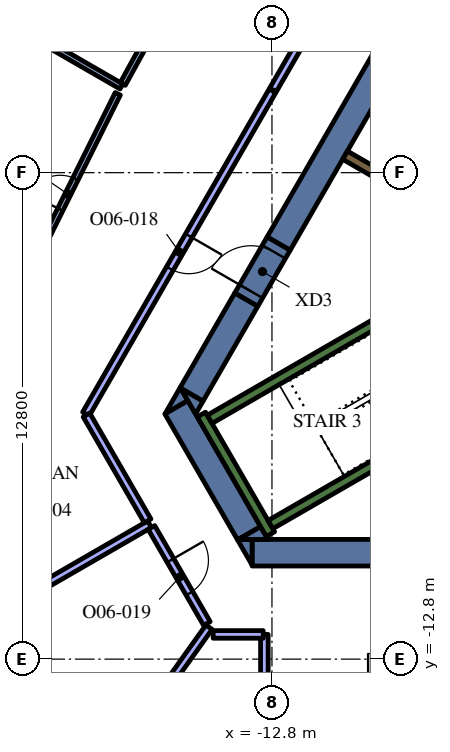
"""IFC4 building model, lengths in metres.
Left out: names, types, materials, properties, quantities, classifications, styles, units other than length and angle.
Written with IfcOpenShell. Run it as: python <this file> out.ifc"""

import sys

from ifc_helpers import new_model, si_unit, direction, frame, frame_2d, origin, place, context, subcontext, project, spatial, polyline, rectangle, outline, extrude, element, fill, save


model = new_model("IFC4")
c1 = context("Model", 3, precision=1e-05, world=origin(), true_north=direction((0.0, 1.0)))
c2 = subcontext(c1, "Body", "Model", "MODEL_VIEW")
j1 = project(units=[si_unit("LENGTHUNIT", "METRE"), si_unit("PLANEANGLEUNIT", "RADIAN")], contexts=[c1])
p1 = place(None, origin())
s1 = spatial("IfcSite", under=j1, at=p1, CompositionType="ELEMENT")
p2 = place(p1, origin())
s2 = spatial("IfcBuilding", under=s1, at=p2, CompositionType="ELEMENT")
p3 = place(p2, frame((0.0, 0.0, 201.6)))
s3 = spatial("IfcBuildingStorey", under=s2, at=p3, CompositionType="ELEMENT", Elevation=201.6)
p4 = place(p3, frame((8.904, -10.0, 0.0), z_axis=(0.0, 0.0, 1.0), x_axis=(-1.0, 0.0, 0.0)))
e1 = element("IfcWall", 1, at=p4, inside=s3, PredefinedType="SOLIDWALL", context=c2, shape_type="SweptSolid", body=[
    extrude(rectangle(XDim=22.226, YDim=0.7, at=frame_2d((11.113, 0.0))), origin(), (0.0, 0.0, 1.0), 4.2),
])
p5 = place(p3, origin())
e2 = element("IfcWall", 2, at=p5, inside=s3, PredefinedType="SOLIDWALL", context=c2, shape_type="SweptSolid", body=[
    extrude(outline(polyline([(-13.712, -9.65), (-13.324, -9.65), (-13.324, -10.322), (-13.712, -9.65)])), origin(), (0.0, 0.0, 1.0), 4.2),
])
p6 = place(p3, frame((-13.402, -9.487, 0.0), z_axis=(0.0, 0.0, 1.0), x_axis=(-0.500020498207, 0.866013568815, 0.0)))
e3 = element("IfcWall", 3, at=p6, inside=s3, PredefinedType="SOLIDWALL", context=c2, shape_type="SweptSolid", body=[
    extrude(rectangle(XDim=3.829, YDim=0.7, at=frame_2d((1.915, 0.0))), origin(), (0.0, 0.0, 1.0), 4.2),
])
e4 = element("IfcWall", 4, at=p5, inside=s3, PredefinedType="SOLIDWALL", context=c2, shape_type="SweptSolid", body=[
    extrude(outline(polyline([(-15.014, -5.995), (-15.611, -6.339), (-15.213, -5.65), (-15.014, -5.995)])), origin(), (0.0, 0.0, 1.0), 4.2),
])
e5 = element("IfcWall", 5, at=p5, inside=s3, PredefinedType="SOLIDWALL", context=c2, shape_type="SweptSolid", body=[
    extrude(outline(polyline([(-12.904, -9.65), (-13.68, -9.65), (-13.098, -9.314), (-12.904, -9.65)])), origin(), (0.0, 0.0, 1.0), 4.2),
])
p7 = place(p3, frame((-13.475, -3.339, 0.0), z_axis=(0.0, 0.0, 1.0), x_axis=(-0.500008214683, -0.866020660983, 0.0)))
e6 = element("IfcWall", 6, at=p7, inside=s3, PredefinedType="SOLIDWALL", context=c2, shape_type="SweptSolid", body=[
    extrude(rectangle(XDim=2.884, YDim=0.7, at=frame_2d((1.442, 0.0))), origin(), (0.0, 0.0, 1.0), 4.2),
])
e7 = element("IfcWall", 7, at=p5, inside=s3, PredefinedType="SOLIDWALL", context=c2, shape_type="SweptSolid", body=[
    extrude(outline(polyline([(-14.809, -6.35), (-15.197, -5.678), (-14.615, -6.014), (-14.809, -6.35)])), origin(), (0.0, 0.0, 1.0), 4.2),
])
p8 = place(p3, frame((-12.625, -1.867, 0.0), z_axis=(0.0, 0.0, 1.0), x_axis=(0.499998841866, 0.866026072432, 0.0)))
e8 = element("IfcWall", 8, at=p8, inside=s3, PredefinedType="SOLIDWALL", context=c2, shape_type="SweptSolid", body=[
    extrude(rectangle(XDim=16.694, YDim=0.7, at=frame_2d((8.347, 0.0))), origin(), (0.0, 0.0, 1.0), 4.2),
])
p9 = place(p3, frame((-12.84, -9.511, 0.0), z_axis=(0.0, 0.0, 1.0), x_axis=(-0.499997733992, 0.866026712061, 0.0)))
e9 = element("IfcWall", 9, at=p9, inside=s3, PredefinedType="SOLIDWALL", context=c2, shape_type="SweptSolid", body=[
    extrude(rectangle(XDim=3.634, YDim=0.25, at=frame_2d((1.817, 0.0))), origin(), (0.0, 0.0, 1.0), 4.2),
])
p10 = place(p3, frame((-14.44, -6.49, 0.0), z_axis=(0.0, 0.0, 1.0), x_axis=(0.866022966069, 0.500004222222, 0.0)))
e10 = element("IfcWall", 10, at=p10, inside=s3, PredefinedType="SOLIDWALL", context=c2, shape_type="SweptSolid", body=[
    extrude(rectangle(XDim=6.8, YDim=0.25, at=frame_2d((3.4, 0.0))), origin(), (0.0, 0.0, 1.0), 4.2),
])
p11 = place(p3, frame((-12.84, -9.261, 0.0), z_axis=(0.0, 0.0, 1.0), x_axis=(0.866016039709, 0.500016218704, 0.0)))
e11 = element("IfcWall", 11, at=p11, inside=s3, PredefinedType="SOLIDWALL", context=c2, shape_type="SweptSolid", body=[
    extrude(rectangle(XDim=7.05, YDim=0.25, at=frame_2d((3.525, 0.0))), origin(), (0.0, 0.0, 1.0), 4.2),
])
p12 = place(p3, frame((-8.106, -1.14, 0.0), z_axis=(0.0, 0.0, 1.0), x_axis=(-0.866008981251, 0.500028443584, 0.0)))
e12 = element("IfcWall", 12, at=p12, inside=s3, PredefinedType="SOLIDWALL", context=c2, shape_type="SweptSolid", body=[
    extrude(rectangle(XDim=3.2, YDim=0.25, at=frame_2d((1.6, 0.0))), origin(), (0.0, 0.0, 1.0), 4.2),
])
p13 = place(p3, frame((-13.475, -3.339, 0.0), z_axis=(0.0, 0.0, 1.0), x_axis=(0.499954529098, 0.86605165483, 0.0)))
e13 = element("IfcWall", 13, at=p13, inside=s3, PredefinedType="SOLIDWALL", context=c2, shape_type="SweptSolid", body=[
    extrude(rectangle(XDim=1.7, YDim=0.7, at=frame_2d((0.85, 0.0))), origin(), (0.0, 0.0, 1.0), 4.2),
])
p14 = place(p13, frame((0.25, 0.0, 0.0)))
e14 = element("IfcOpeningElement", 14, at=p14, cuts=e13, PredefinedType="OPENING", context=c2, shape_type="SweptSolid", body=[
    extrude(rectangle(XDim=1.2, YDim=2.1, at=frame_2d((0.6, 1.05))), frame((0.0, 0.36, 0.0), z_axis=(0.0, -1.0, 0.0), x_axis=(1.0, 0.0, 0.0)), (0.0, 0.0, 1.0), 0.72),
])
p15 = place(p3, frame((-18.709, -17.916, 0.0), z_axis=(0.0, 0.0, 1.0), x_axis=(0.581023578026, 0.813886725397, 0.0)))
e15 = element("IfcWall", 15, at=p15, inside=s3, PredefinedType="PARTITIONING", context=c2, shape_type="SweptSolid", body=[
    extrude(rectangle(XDim=7.318, YDim=0.2, at=frame_2d((3.659, 0.0))), origin(), (0.0, 0.0, 1.0), 3.45),
])
p16 = place(p3, frame((-13.0, -12.15, 0.0), z_axis=(0.0, 0.0, 1.0), x_axis=(0.0, -1.0, 0.0)))
e16 = element("IfcWall", 16, at=p16, inside=s3, PredefinedType="PARTITIONING", context=c2, shape_type="SweptSolid", body=[
    extrude(rectangle(XDim=1.5, YDim=0.2, at=frame_2d((0.75, 0.0))), origin(), (0.0, 0.0, 1.0), 3.45),
])
p17 = place(p3, frame((-14.347, -12.15, 0.0), z_axis=(0.0, 0.0, 1.0), x_axis=(1.0, 0.0, 0.0)))
e17 = element("IfcWall", 17, at=p17, inside=s3, PredefinedType="PARTITIONING", context=c2, shape_type="SweptSolid", body=[
    extrude(rectangle(XDim=1.317, YDim=0.2, at=frame_2d((0.659, 0.0))), origin(), (0.0, 0.0, 1.0), 3.45),
])
p18 = place(p3, frame((-16.761, 2.268, 0.0), z_axis=(0.0, 0.0, 1.0), x_axis=(-0.866022812202, 0.500004488726, 0.0)))
e18 = element("IfcWall", 18, at=p18, inside=s3, PredefinedType="PARTITIONING", context=c2, shape_type="SweptSolid", body=[
    extrude(rectangle(XDim=3.247, YDim=0.15, at=frame_2d((1.624, 0.0))), origin(), (0.0, 0.0, 1.0), 3.45),
])
p19 = place(p3, frame((-16.725, 2.333, 0.0), z_axis=(0.0, 0.0, 1.0), x_axis=(0.480955103875, 0.876745224142, 0.0)))
e19 = element("IfcWall", 19, at=p19, inside=s3, PredefinedType="PARTITIONING", context=c2, shape_type="SweptSolid", body=[
    extrude(rectangle(XDim=6.129, YDim=0.15, at=frame_2d((3.064, 0.0))), origin(), (0.0, 0.0, 1.0), 3.45),
])
p20 = place(p19, frame((2.629, 0.0, 0.0)))
e20 = element("IfcOpeningElement", 20, at=p20, cuts=e19, PredefinedType="OPENING", context=c2, shape_type="SweptSolid", body=[
    extrude(rectangle(XDim=0.9, YDim=2.1, at=frame_2d((0.45, 1.05))), frame((0.0, 0.085, 0.0), z_axis=(0.0, -1.0, 0.0), x_axis=(1.0, 0.0, 0.0)), (0.0, 0.0, 1.0), 0.17),
])
p21 = place(p3, frame((-19.467, -3.175, 0.0), z_axis=(0.0, 0.0, 1.0), x_axis=(0.445180755526, 0.895440726631, 0.0)))
e21 = element("IfcWall", 21, at=p21, inside=s3, PredefinedType="PARTITIONING", context=c2, shape_type="SweptSolid", body=[
    extrude(rectangle(XDim=5.864, YDim=0.15, at=frame_2d((2.932, 0.0))), origin(), (0.0, 0.0, 1.0), 3.45),
])
p22 = place(p21, frame((2.464, 0.0, 0.0)))
e22 = element("IfcOpeningElement", 22, at=p22, cuts=e21, PredefinedType="OPENING", context=c2, shape_type="SweptSolid", body=[
    extrude(rectangle(XDim=0.9, YDim=2.1, at=frame_2d((0.45, 1.05))), frame((0.0, 0.085, 0.0), z_axis=(0.0, -1.0, 0.0), x_axis=(1.0, 0.0, 0.0)), (0.0, 0.0, 1.0), 0.17),
])
p23 = place(p3, frame((-16.021, -9.25, 0.0), z_axis=(0.0, 0.0, 1.0), x_axis=(-0.86601739438, -0.500013872438, 0.0)))
e23 = element("IfcWall", 23, at=p23, inside=s3, PredefinedType="PARTITIONING", context=c2, shape_type="SweptSolid", body=[
    extrude(rectangle(XDim=6.478, YDim=0.2, at=frame_2d((3.239, 0.0))), origin(), (0.0, 0.0, 1.0), 3.45),
])
p24 = place(p3, frame((-8.272, 9.972, 0.0), z_axis=(0.0, 0.0, 1.0), x_axis=(-0.5000018851, -0.866024315419, 0.0)))
e24 = element("IfcWall", 24, at=p24, inside=s3, PredefinedType="PARTITIONING", context=c2, shape_type="SweptSolid", body=[
    extrude(rectangle(XDim=9.0, YDim=0.2, at=frame_2d((4.5, 0.0))), origin(), (0.0, 0.0, 1.0), 3.45),
])
p25 = place(p3, frame((-12.787, 2.152, 0.0), z_axis=(0.0, 0.0, 1.0), x_axis=(-0.50000660679, -0.866021589319, 0.0)))
e25 = element("IfcWall", 25, at=p25, inside=s3, PredefinedType="PARTITIONING", context=c2, shape_type="SweptSolid", body=[
    extrude(rectangle(XDim=9.817, YDim=0.2, at=frame_2d((4.909, 0.0))), origin(), (0.0, 0.0, 1.0), 3.45),
])
p26 = place(p25, frame((4.4, 0.0, 0.0)))
e26 = element("IfcOpeningElement", 26, at=p26, cuts=e25, PredefinedType="OPENING", context=c2, shape_type="SweptSolid", body=[
    extrude(rectangle(XDim=1.0, YDim=2.1, at=frame_2d((0.5, 1.05))), frame((0.0, 0.11, 0.0), z_axis=(0.0, -1.0, 0.0), x_axis=(1.0, 0.0, 0.0)), (0.0, 0.0, 1.0), 0.22),
])
p27 = place(p3, frame((-17.681, -6.376, 0.0), z_axis=(0.0, 0.0, 1.0), x_axis=(0.500022299258, -0.866012528919, 0.0)))
e27 = element("IfcWall", 27, at=p27, inside=s3, PredefinedType="PARTITIONING", context=c2, shape_type="SweptSolid", body=[
    extrude(rectangle(XDim=3.219, YDim=0.2, at=frame_2d((1.609, 0.0))), origin(), (0.0, 0.0, 1.0), 3.45),
])
p28 = place(p3, frame((-15.971, -9.337, 0.0), z_axis=(0.0, 0.0, 1.0), x_axis=(0.500007233661, -0.866021227388, 0.0)))
e28 = element("IfcWall", 28, at=p28, inside=s3, PredefinedType="PARTITIONING", context=c2, shape_type="SweptSolid", body=[
    extrude(rectangle(XDim=2.919, YDim=0.2, at=frame_2d((1.459, 0.0))), origin(), (0.0, 0.0, 1.0), 3.45),
])
p29 = place(p28, frame((1.0, 0.0, 0.0)))
e29 = element("IfcOpeningElement", 29, at=p29, cuts=e28, PredefinedType="OPENING", context=c2, shape_type="SweptSolid", body=[
    extrude(rectangle(XDim=1.0, YDim=2.1, at=frame_2d((0.5, 1.05))), frame((0.0, 0.11, 0.0), z_axis=(0.0, -1.0, 0.0), x_axis=(1.0, 0.0, 0.0)), (0.0, 0.0, 1.0), 0.22),
])
p30 = place(p14, origin())
e30 = element("IfcDoor", 30, at=p30, inside=s3, OperationType="SINGLE_SWING_LEFT", PredefinedType="DOOR", context=c2, shape_type="SweptSolid", body=[
    extrude(rectangle(XDim=1.2, YDim=2.1, at=frame_2d((0.6, 1.05))), frame((0.0, 0.025, 0.0), z_axis=(0.0, -1.0, 0.0), x_axis=(1.0, 0.0, 0.0)), (0.0, 0.0, 1.0), 0.05),
])
fill(e14, e30)
p31 = place(p22, origin())
e31 = element("IfcDoor", 31, at=p31, inside=s3, OperationType="SINGLE_SWING_LEFT", PredefinedType="DOOR", context=c2, shape_type="SweptSolid", body=[
    extrude(rectangle(XDim=0.9, YDim=2.1, at=frame_2d((0.45, 1.05))), frame((0.0, 0.025, 0.0), z_axis=(0.0, -1.0, 0.0), x_axis=(1.0, 0.0, 0.0)), (0.0, 0.0, 1.0), 0.05),
])
fill(e22, e31)
p32 = place(p26, origin())
e32 = element("IfcDoor", 32, at=p32, inside=s3, OperationType="SINGLE_SWING_LEFT", PredefinedType="DOOR", context=c2, shape_type="SweptSolid", body=[
    extrude(rectangle(XDim=1.0, YDim=2.1, at=frame_2d((0.5, 1.05))), frame((0.0, 0.025, 0.0), z_axis=(0.0, -1.0, 0.0), x_axis=(1.0, 0.0, 0.0)), (0.0, 0.0, 1.0), 0.05),
])
fill(e26, e32)
p33 = place(p29, origin())
e33 = element("IfcDoor", 33, at=p33, inside=s3, OperationType="SINGLE_SWING_RIGHT", PredefinedType="DOOR", context=c2, shape_type="SweptSolid", body=[
    extrude(rectangle(XDim=1.0, YDim=2.1, at=frame_2d((0.5, 1.05))), frame((0.0, 0.025, 0.0), z_axis=(0.0, -1.0, 0.0), x_axis=(1.0, 0.0, 0.0)), (0.0, 0.0, 1.0), 0.05),
])
fill(e29, e33)
save(model, sys.argv[1])
